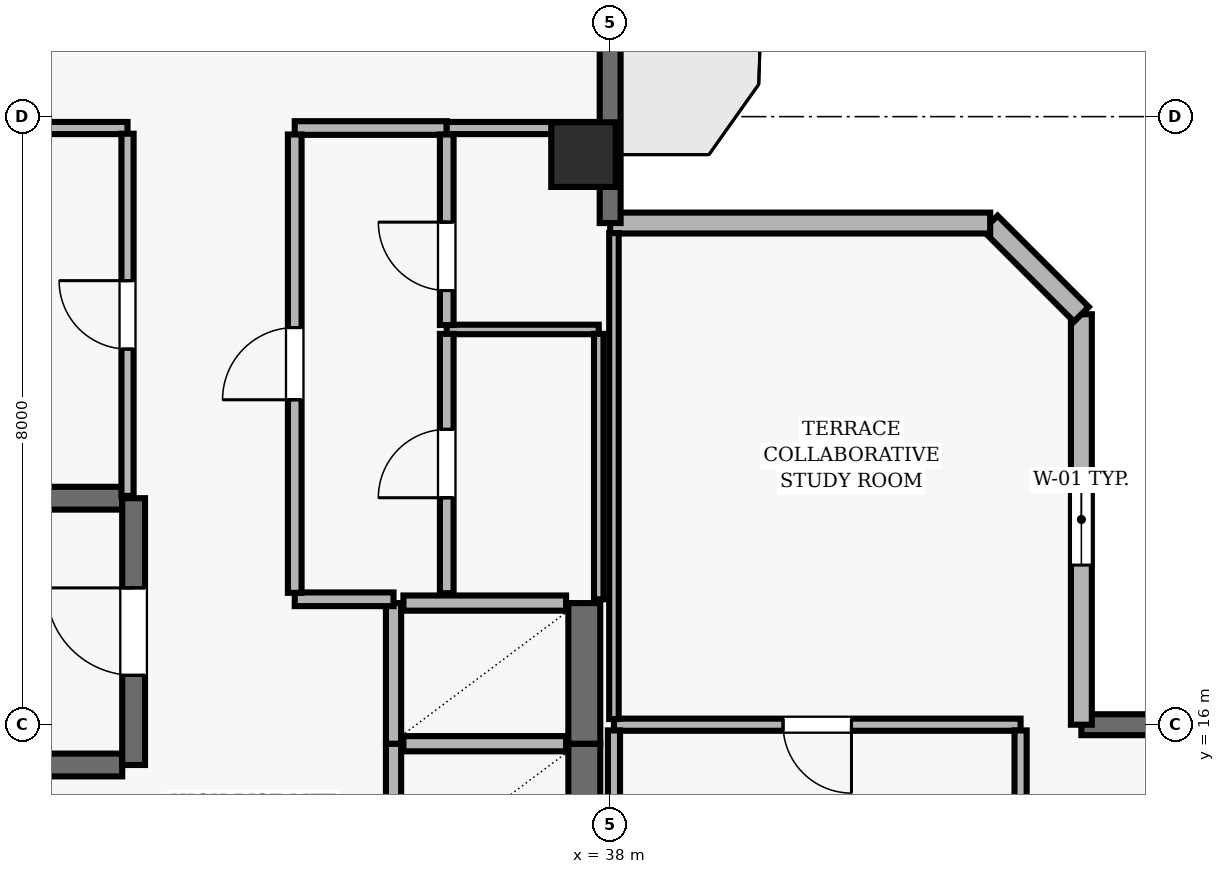
"""IFC4 building model, lengths in metres.
Left out: names, types, materials, properties, quantities, classifications, styles, units other than length and angle.
Written with IfcOpenShell. Run it as: python <this file> out.ifc"""

import sys

from ifc_helpers import new_model, si_unit, direction, frame, frame_2d, origin, origin_2d, place, context, subcontext, project, spatial, rectangle, extrude, element, fill, save


model = new_model("IFC4")
c1 = context("Model", 3, precision=1e-05, world=origin(), true_north=direction((0.0, 1.0)))
c2 = subcontext(c1, "Body", "Model", "MODEL_VIEW")
j1 = project(units=[si_unit("LENGTHUNIT", "METRE"), si_unit("PLANEANGLEUNIT", "RADIAN")], contexts=[c1])
p1 = place(None, origin())
s1 = spatial("IfcSite", under=j1, at=p1, CompositionType="ELEMENT")
p2 = place(p1, origin())
s2 = spatial("IfcBuilding", under=s1, at=p2, CompositionType="ELEMENT")
p3 = place(p2, frame((0.0, 0.0, 275.5)))
s3 = spatial("IfcBuildingStorey", under=s2, at=p3, CompositionType="ELEMENT", Elevation=275.5)
p4 = place(p3, frame((37.65, 23.5, 0.0), z_axis=(0.0, 0.0, 1.0), x_axis=(1.0, 0.0, 0.0)))
e1 = element("IfcColumn", 1, at=p4, inside=s3, PredefinedType="COLUMN", context=c2, shape_type="SweptSolid", body=[
    extrude(rectangle(XDim=0.85, YDim=0.85, at=origin_2d()), origin(), (0.0, 0.0, 1.0), 3.9),
])
p5 = place(p3, frame((57.3, 16.0, 0.0), z_axis=(0.0, 0.0, 1.0), x_axis=(-1.0, 0.0, 0.0)))
e2 = element("IfcWall", 2, at=p5, inside=s3, PredefinedType="SOLIDWALL", context=c2, shape_type="SweptSolid", body=[
    extrude(rectangle(XDim=13.1, YDim=0.275, at=frame_2d((6.55, 0.0))), origin(), (0.0, 0.0, 1.0), 3.69),
])
p6 = place(p5, frame((7.05, 0.0, 0.0)))
e3 = element("IfcOpeningElement", 3, at=p6, cuts=e2, PredefinedType="OPENING", context=c2, shape_type="SweptSolid", body=[
    extrude(rectangle(XDim=1.0, YDim=2.2, at=frame_2d((0.5, 1.1))), frame((0.0, 0.147, 0.0), z_axis=(0.0, -1.0, 0.0), x_axis=(1.0, 0.0, 0.0)), (0.0, 0.0, 1.0), 0.295),
])
p7 = place(p3, frame((44.2, 16.0, 0.0), z_axis=(0.0, 0.0, 1.0), x_axis=(0.0, 1.0, 0.0)))
e4 = element("IfcWall", 4, at=p7, inside=s3, PredefinedType="SOLIDWALL", context=c2, shape_type="SweptSolid", body=[
    extrude(rectangle(XDim=5.4, YDim=0.275, at=frame_2d((2.7, 0.0))), origin(), (0.0, 0.0, 1.0), 3.69),
])
p8 = place(p7, frame((2.1, 0.0, 0.9)))
e5 = element("IfcOpeningElement", 5, at=p8, cuts=e4, PredefinedType="OPENING", context=c2, shape_type="SweptSolid", body=[
    extrude(rectangle(XDim=1.2, YDim=1.6, at=frame_2d((0.6, 0.8))), frame((0.0, 0.147, 0.0), z_axis=(0.0, -1.0, 0.0), x_axis=(1.0, 0.0, 0.0)), (0.0, 0.0, 1.0), 0.295),
])
p9 = place(p3, frame((44.2, 21.4, 0.0), z_axis=(0.0, 0.0, 1.0), x_axis=(-0.707034851297, 0.707178703759, 0.0)))
e6 = element("IfcWall", 6, at=p9, inside=s3, PredefinedType="SOLIDWALL", context=c2, shape_type="SweptSolid", body=[
    extrude(rectangle(XDim=1.697, YDim=0.275, at=frame_2d((0.849, 0.0))), origin(), (0.0, 0.0, 1.0), 3.69),
])
p10 = place(p3, frame((43.0, 22.6, 0.0), z_axis=(0.0, 0.0, 1.0), x_axis=(-1.0, 0.0, 0.0)))
e7 = element("IfcWall", 7, at=p10, inside=s3, PredefinedType="SOLIDWALL", context=c2, shape_type="SweptSolid", body=[
    extrude(rectangle(XDim=5.0, YDim=0.275, at=frame_2d((2.5, 0.0))), origin(), (0.0, 0.0, 1.0), 3.69),
])
p11 = place(p3, frame((38.0, 22.6, 0.0), z_axis=(0.0, 0.0, 1.0), x_axis=(0.0, 1.0, 0.0)))
e8 = element("IfcWall", 8, at=p11, inside=s3, PredefinedType="SOLIDWALL", context=c2, shape_type="SweptSolid", body=[
    extrude(rectangle(XDim=12.7, YDim=0.275, at=frame_2d((6.35, 0.0))), origin(), (0.0, 0.0, 1.0), 3.69),
])
p12 = place(p11, frame((4.85, 0.0, 0.0)))
e9 = element("IfcOpeningElement", 9, at=p12, cuts=e8, PredefinedType="OPENING", context=c2, shape_type="SweptSolid", body=[
    extrude(rectangle(XDim=1.0, YDim=2.2, at=frame_2d((0.5, 1.1))), frame((0.0, 0.147, 0.0), z_axis=(0.0, -1.0, 0.0), x_axis=(1.0, 0.0, 0.0)), (0.0, 0.0, 1.0), 0.295),
])
p13 = place(p11, frame((8.475, 0.0, 0.9)))
e10 = element("IfcOpeningElement", 10, at=p13, cuts=e8, PredefinedType="OPENING", context=c2, shape_type="SweptSolid", body=[
    extrude(rectangle(XDim=2.1, YDim=1.6, at=frame_2d((1.05, 0.8))), frame((0.0, 0.147, 0.0), z_axis=(0.0, -1.0, 0.0), x_axis=(1.0, 0.0, 0.0)), (0.0, 0.0, 1.0), 0.295),
])
for number, where, z_axis, x_axis in (
    (11, (31.58, 18.98, 0.0), (0.0, 0.0, 1.0), (-1.0, 0.0, 0.0)),
    (12, (23.22, 15.47, 0.0), (0.0, 0.0, 1.0), (1.0, 0.0, 0.0)),
):
    element("IfcWall", number, at=place(p3, frame(where, z_axis=z_axis, x_axis=x_axis)), inside=s3, PredefinedType="SHEAR", context=c2, shape_type="SweptSolid", body=[
        extrude(rectangle(XDim=8.36, YDim=0.3, at=frame_2d((4.18, 0.0))), origin(), (0.0, 0.0, 1.0), 3.69),
    ])
p14 = place(p3, frame((31.73, 15.47, 0.0), z_axis=(0.0, 0.0, 1.0), x_axis=(0.0, 1.0, 0.0)))
e13 = element("IfcWall", 13, at=p14, inside=s3, PredefinedType="SHEAR", context=c2, shape_type="SweptSolid", body=[
    extrude(rectangle(XDim=3.51, YDim=0.3, at=frame_2d((1.755, 0.0))), origin(), (0.0, 0.0, 1.0), 3.69),
])
p15 = place(p14, frame((1.18, 0.0, 0.0)))
e14 = element("IfcOpeningElement", 14, at=p15, cuts=e13, PredefinedType="OPENING", context=c2, shape_type="SweptSolid", body=[
    extrude(rectangle(XDim=1.15, YDim=2.15, at=frame_2d((0.575, 1.075))), frame((0.0, 0.16, 0.0), z_axis=(0.0, -1.0, 0.0), x_axis=(1.0, 0.0, 0.0)), (0.0, 0.0, 1.0), 0.32),
])
p16 = place(p3, frame((35.15, 15.75, 0.0), z_axis=(0.0, 0.0, 1.0), x_axis=(0.0, -1.0, 0.0)))
e15 = element("IfcWall", 15, at=p16, inside=s3, PredefinedType="SOLIDWALL", context=c2, shape_type="SweptSolid", body=[
    extrude(rectangle(XDim=1.85, YDim=0.2, at=frame_2d((0.925, 0.0))), origin(), (0.0, 0.0, 1.0), 3.69),
])
p17 = place(p3, frame((37.66, 13.9, 0.0), z_axis=(0.0, 0.0, 1.0), x_axis=(0.0, 1.0, 0.0)))
e16 = element("IfcWall", 16, at=p17, inside=s3, PredefinedType="SHEAR", context=c2, shape_type="SweptSolid", body=[
    extrude(rectangle(XDim=1.85, YDim=0.42, at=frame_2d((0.925, 0.0))), origin(), (0.0, 0.0, 1.0), 3.69),
])
p18 = place(p3, frame((37.42, 15.75, 0.0), z_axis=(0.0, 0.0, 1.0), x_axis=(-1.0, 0.0, 0.0)))
e17 = element("IfcWall", 17, at=p18, inside=s3, PredefinedType="SOLIDWALL", context=c2, shape_type="SweptSolid", body=[
    extrude(rectangle(XDim=2.14, YDim=0.2, at=frame_2d((1.07, 0.0))), origin(), (0.0, 0.0, 1.0), 3.69),
])
p19 = place(p3, frame((35.15, 17.6, 0.0), z_axis=(0.0, 0.0, 1.0), x_axis=(0.0, -1.0, 0.0)))
e18 = element("IfcWall", 18, at=p19, inside=s3, PredefinedType="SOLIDWALL", context=c2, shape_type="SweptSolid", body=[
    extrude(rectangle(XDim=1.85, YDim=0.2, at=frame_2d((0.925, 0.0))), origin(), (0.0, 0.0, 1.0), 3.69),
])
p20 = place(p3, frame((37.66, 15.75, 0.0), z_axis=(0.0, 0.0, 1.0), x_axis=(0.0, 1.0, 0.0)))
e19 = element("IfcWall", 19, at=p20, inside=s3, PredefinedType="SHEAR", context=c2, shape_type="SweptSolid", body=[
    extrude(rectangle(XDim=1.85, YDim=0.42, at=frame_2d((0.925, 0.0))), origin(), (0.0, 0.0, 1.0), 3.69),
])
p21 = place(p3, frame((37.42, 17.6, 0.0), z_axis=(0.0, 0.0, 1.0), x_axis=(-1.0, 0.0, 0.0)))
e20 = element("IfcWall", 20, at=p21, inside=s3, PredefinedType="SOLIDWALL", context=c2, shape_type="SweptSolid", body=[
    extrude(rectangle(XDim=2.14, YDim=0.2, at=frame_2d((1.07, 0.0))), origin(), (0.0, 0.0, 1.0), 3.69),
])
p22 = place(p3, frame((31.65, 23.85, 0.0), z_axis=(0.0, 0.0, 1.0), x_axis=(-1.0, 0.0, 0.0)))
e21 = element("IfcWall", 21, at=p22, inside=s3, PredefinedType="PARTITIONING", context=c2, shape_type="SweptSolid", body=[
    extrude(rectangle(XDim=2.85, YDim=0.16, at=frame_2d((1.425, 0.0))), origin(), (0.0, 0.0, 1.0), 3.227),
])
p23 = place(p3, frame((33.85, 17.65, 0.0), z_axis=(0.0, 0.0, 1.0), x_axis=(1.0, 0.0, 0.0)))
e22 = element("IfcWall", 22, at=p23, inside=s3, PredefinedType="PARTITIONING", context=c2, shape_type="SweptSolid", body=[
    extrude(rectangle(XDim=1.3, YDim=0.18, at=frame_2d((0.65, 0.0))), origin(), (0.0, 0.0, 1.0), 3.69),
])
p24 = place(p3, frame((35.85, 21.2, 0.0), z_axis=(0.0, 0.0, 1.0), x_axis=(1.0, 0.0, 0.0)))
e23 = element("IfcWall", 23, at=p24, inside=s3, PredefinedType="PARTITIONING", context=c2, shape_type="SweptSolid", body=[
    extrude(rectangle(XDim=2.0, YDim=0.125, at=frame_2d((1.0, 0.0))), origin(), (0.0, 0.0, 1.0), 3.69),
])
p25 = place(p3, frame((35.85, 23.85, 0.0), z_axis=(0.0, 0.0, 1.0), x_axis=(-1.0, 0.0, 0.0)))
e24 = element("IfcWall", 24, at=p25, inside=s3, PredefinedType="PARTITIONING", context=c2, shape_type="SweptSolid", body=[
    extrude(rectangle(XDim=2.0, YDim=0.18, at=frame_2d((1.0, 0.0))), origin(), (0.0, 0.0, 1.0), 3.227),
])
p26 = place(p3, frame((37.85, 23.85, 0.0), z_axis=(0.0, 0.0, 1.0), x_axis=(-1.0, 0.0, 0.0)))
e25 = element("IfcWall", 25, at=p26, inside=s3, PredefinedType="PARTITIONING", context=c2, shape_type="SweptSolid", body=[
    extrude(rectangle(XDim=2.0, YDim=0.16, at=frame_2d((1.0, 0.0))), origin(), (0.0, 0.0, 1.0), 3.227),
])
p27 = place(p3, frame((43.4, 16.0, 0.0), z_axis=(0.0, 0.0, 1.0), x_axis=(-1.0, 0.0, 0.0)))
e26 = element("IfcWall", 26, at=p27, inside=s3, PredefinedType="PARTITIONING", context=c2, shape_type="SweptSolid", body=[
    extrude(rectangle(XDim=5.35, YDim=0.16, at=frame_2d((2.675, 0.0))), origin(), (0.0, 0.0, 1.0), 3.39),
])
p28 = place(p27, frame((2.225, 0.0, 0.0)))
e27 = element("IfcOpeningElement", 27, at=p28, cuts=e26, PredefinedType="OPENING", context=c2, shape_type="SweptSolid", body=[
    extrude(rectangle(XDim=0.9, YDim=2.1, at=frame_2d((0.45, 1.05))), frame((0.0, 0.09, 0.0), z_axis=(0.0, -1.0, 0.0), x_axis=(1.0, 0.0, 0.0)), (0.0, 0.0, 1.0), 0.18),
])
p29 = place(p3, frame((31.65, 19.01, 0.0), z_axis=(0.0, 0.0, 1.0), x_axis=(0.0, 1.0, 0.0)))
e28 = element("IfcWall", 28, at=p29, inside=s3, PredefinedType="PARTITIONING", context=c2, shape_type="SweptSolid", body=[
    extrude(rectangle(XDim=4.765, YDim=0.16, at=frame_2d((2.382, 0.0))), origin(), (0.0, 0.0, 1.0), 3.69),
])
p30 = place(p29, frame((1.932, 0.0, 0.0)))
e29 = element("IfcOpeningElement", 29, at=p30, cuts=e28, PredefinedType="OPENING", context=c2, shape_type="SweptSolid", body=[
    extrude(rectangle(XDim=0.9, YDim=2.1, at=frame_2d((0.45, 1.05))), frame((0.0, 0.09, 0.0), z_axis=(0.0, -1.0, 0.0), x_axis=(1.0, 0.0, 0.0)), (0.0, 0.0, 1.0), 0.18),
])
p31 = place(p3, frame((33.85, 17.735, 0.0), z_axis=(0.0, 0.0, 1.0), x_axis=(0.0, 1.0, 0.0)))
e30 = element("IfcWall", 30, at=p31, inside=s3, PredefinedType="PARTITIONING", context=c2, shape_type="SweptSolid", body=[
    extrude(rectangle(XDim=6.03, YDim=0.18, at=frame_2d((3.015, 0.0))), origin(), (0.0, 0.0, 1.0), 3.69),
])
p32 = place(p31, frame((2.54, 0.0, 0.0)))
e31 = element("IfcOpeningElement", 31, at=p32, cuts=e30, PredefinedType="OPENING", context=c2, shape_type="SweptSolid", body=[
    extrude(rectangle(XDim=0.95, YDim=2.1, at=frame_2d((0.475, 1.05))), frame((0.0, 0.1, 0.0), z_axis=(0.0, -1.0, 0.0), x_axis=(1.0, 0.0, 0.0)), (0.0, 0.0, 1.0), 0.2),
])
p33 = place(p3, frame((35.85, 17.73, 0.0), z_axis=(0.0, 0.0, 1.0), x_axis=(0.0, 1.0, 0.0)))
e32 = element("IfcWall", 32, at=p33, inside=s3, PredefinedType="PARTITIONING", context=c2, shape_type="SweptSolid", body=[
    extrude(rectangle(XDim=3.412, YDim=0.18, at=frame_2d((1.706, 0.0))), origin(), (0.0, 0.0, 1.0), 3.69),
])
p34 = place(p33, frame((1.256, 0.0, 0.0)))
e33 = element("IfcOpeningElement", 33, at=p34, cuts=e32, PredefinedType="OPENING", context=c2, shape_type="SweptSolid", body=[
    extrude(rectangle(XDim=0.9, YDim=2.1, at=frame_2d((0.45, 1.05))), frame((0.0, 0.1, 0.0), z_axis=(0.0, -1.0, 0.0), x_axis=(1.0, 0.0, 0.0)), (0.0, 0.0, 1.0), 0.2),
])
p35 = place(p3, frame((35.85, 21.258, 0.0), z_axis=(0.0, 0.0, 1.0), x_axis=(0.0, 1.0, 0.0)))
e34 = element("IfcWall", 34, at=p35, inside=s3, PredefinedType="PARTITIONING", context=c2, shape_type="SweptSolid", body=[
    extrude(rectangle(XDim=2.507, YDim=0.18, at=frame_2d((1.253, 0.0))), origin(), (0.0, 0.0, 1.0), 3.69),
])
p36 = place(p35, frame((0.454, 0.0, 0.0)))
e35 = element("IfcOpeningElement", 35, at=p36, cuts=e34, PredefinedType="OPENING", context=c2, shape_type="SweptSolid", body=[
    extrude(rectangle(XDim=0.9, YDim=2.1, at=frame_2d((0.45, 1.05))), frame((0.0, 0.1, 0.0), z_axis=(0.0, -1.0, 0.0), x_axis=(1.0, 0.0, 0.0)), (0.0, 0.0, 1.0), 0.2),
])
p37 = place(p3, frame((37.85, 17.65, 0.0), z_axis=(0.0, 0.0, 1.0), x_axis=(0.0, 1.0, 0.0)))
e36 = element("IfcWall", 36, at=p37, inside=s3, PredefinedType="PARTITIONING", context=c2, shape_type="SweptSolid", body=[
    extrude(rectangle(XDim=3.492, YDim=0.125, at=frame_2d((1.746, 0.0))), origin(), (0.0, 0.0, 1.0), 3.227),
])
p38 = place(p3, frame((38.05, 15.925, 0.0), z_axis=(0.0, 0.0, 1.0), x_axis=(0.0, -1.0, 0.0)))
e37 = element("IfcWall", 37, at=p38, inside=s3, PredefinedType="PARTITIONING", context=c2, shape_type="SweptSolid", body=[
    extrude(rectangle(XDim=6.375, YDim=0.16, at=frame_2d((3.188, 0.0))), origin(), (0.0, 0.0, 1.0), 3.227),
])
p39 = place(p3, frame((38.05, 22.468, 0.0), z_axis=(0.0, 0.0, 1.0), x_axis=(0.0, -1.0, 0.0)))
e38 = element("IfcWall", 38, at=p39, inside=s3, PredefinedType="PARTITIONING", context=c2, shape_type="SweptSolid", body=[
    extrude(rectangle(XDim=6.393, YDim=0.125, at=frame_2d((3.197, 0.0))), origin(), (0.0, 0.0, 1.0), 3.227),
])
p40 = place(p3, frame((43.4, 10.425, 0.0), z_axis=(0.0, 0.0, 1.0), x_axis=(0.0, 1.0, 0.0)))
e39 = element("IfcWall", 39, at=p40, inside=s3, PredefinedType="PARTITIONING", context=c2, shape_type="SweptSolid", body=[
    extrude(rectangle(XDim=5.5, YDim=0.16, at=frame_2d((2.75, 0.0))), origin(), (0.0, 0.0, 1.0), 3.69),
])
p41 = place(p40, frame((2.3, 0.0, 0.0)))
e40 = element("IfcOpeningElement", 40, at=p41, cuts=e39, PredefinedType="OPENING", context=c2, shape_type="SweptSolid", body=[
    extrude(rectangle(XDim=0.9, YDim=2.1, at=frame_2d((0.45, 1.05))), frame((0.0, 0.09, 0.0), z_axis=(0.0, -1.0, 0.0), x_axis=(1.0, 0.0, 0.0)), (0.0, 0.0, 1.0), 0.18),
])
p42 = place(p8, origin())
e41 = element("IfcWindow", 41, at=p42, inside=s3, PartitioningType="SINGLE_PANEL", PredefinedType="WINDOW", context=c2, shape_type="SweptSolid", body=[
    extrude(rectangle(XDim=1.2, YDim=1.6, at=frame_2d((0.6, 0.8))), frame((0.0, 0.03, 0.0), z_axis=(0.0, -1.0, 0.0), x_axis=(1.0, 0.0, 0.0)), (0.0, 0.0, 1.0), 0.06),
])
fill(e5, e41)
p43 = place(p15, origin())
e42 = element("IfcDoor", 42, at=p43, inside=s3, OperationType="SINGLE_SWING_RIGHT", PredefinedType="DOOR", context=c2, shape_type="SweptSolid", body=[
    extrude(rectangle(XDim=1.15, YDim=2.15, at=frame_2d((0.575, 1.075))), frame((0.0, 0.025, 0.0), z_axis=(0.0, -1.0, 0.0), x_axis=(1.0, 0.0, 0.0)), (0.0, 0.0, 1.0), 0.05),
])
fill(e14, e42)
p44 = place(p32, origin())
e43 = element("IfcDoor", 43, at=p44, inside=s3, OperationType="SINGLE_SWING_LEFT", PredefinedType="DOOR", context=c2, shape_type="SweptSolid", body=[
    extrude(rectangle(XDim=0.95, YDim=2.1, at=frame_2d((0.475, 1.05))), frame((0.0, 0.025, 0.0), z_axis=(0.0, -1.0, 0.0), x_axis=(1.0, 0.0, 0.0)), (0.0, 0.0, 1.0), 0.05),
])
fill(e31, e43)
p45 = place(p36, origin())
e44 = element("IfcDoor", 44, at=p45, inside=s3, OperationType="SINGLE_SWING_RIGHT", PredefinedType="DOOR", context=c2, shape_type="SweptSolid", body=[
    extrude(rectangle(XDim=0.9, YDim=2.1, at=frame_2d((0.45, 1.05))), frame((0.0, 0.025, 0.0), z_axis=(0.0, -1.0, 0.0), x_axis=(1.0, 0.0, 0.0)), (0.0, 0.0, 1.0), 0.05),
])
fill(e35, e44)
p46 = place(p34, origin())
e45 = element("IfcDoor", 45, at=p46, inside=s3, OperationType="SINGLE_SWING_LEFT", PredefinedType="DOOR", context=c2, shape_type="SweptSolid", body=[
    extrude(rectangle(XDim=0.9, YDim=2.1, at=frame_2d((0.45, 1.05))), frame((0.0, 0.025, 0.0), z_axis=(0.0, -1.0, 0.0), x_axis=(1.0, 0.0, 0.0)), (0.0, 0.0, 1.0), 0.05),
])
fill(e33, e45)
p47 = place(p30, origin())
e46 = element("IfcDoor", 46, at=p47, inside=s3, OperationType="SINGLE_SWING_RIGHT", PredefinedType="DOOR", context=c2, shape_type="SweptSolid", body=[
    extrude(rectangle(XDim=0.9, YDim=2.1, at=frame_2d((0.45, 1.05))), frame((0.0, 0.025, 0.0), z_axis=(0.0, -1.0, 0.0), x_axis=(1.0, 0.0, 0.0)), (0.0, 0.0, 1.0), 0.05),
])
fill(e29, e46)
p48 = place(p28, origin())
e47 = element("IfcDoor", 47, at=p48, inside=s3, OperationType="SINGLE_SWING_LEFT", PredefinedType="DOOR", context=c2, shape_type="SweptSolid", body=[
    extrude(rectangle(XDim=0.9, YDim=2.1, at=frame_2d((0.45, 1.05))), frame((0.0, 0.025, 0.0), z_axis=(0.0, -1.0, 0.0), x_axis=(1.0, 0.0, 0.0)), (0.0, 0.0, 1.0), 0.05),
])
fill(e27, e47)
save(model, sys.argv[1])
